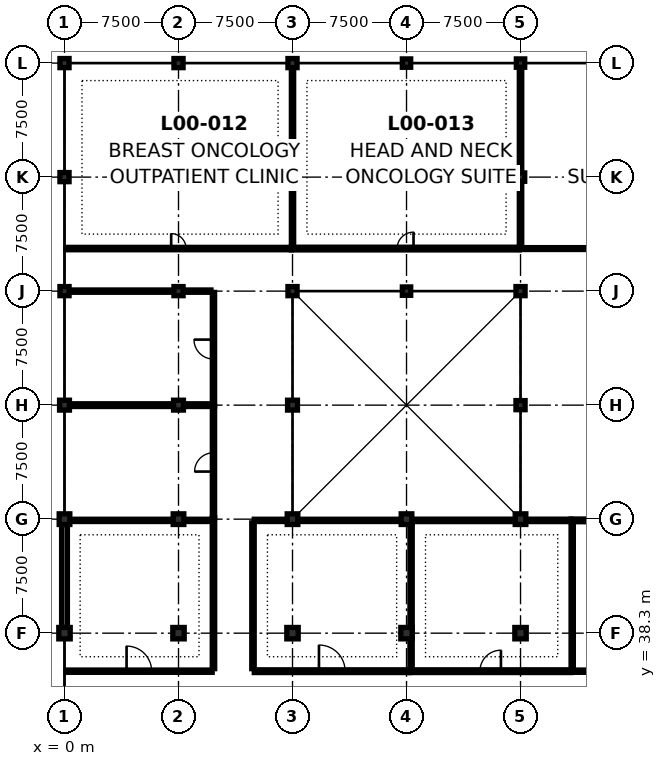
"""IFC4 building model, lengths in metres.
Left out: names, types, materials, properties, quantities, classifications, styles, units other than length and angle.
Written with IfcOpenShell. Run it as: python <this file> out.ifc"""

import sys

from ifc_helpers import new_model, si_unit, direction, frame, frame_2d, origin, origin_2d, place, context, subcontext, project, spatial, rectangle, extrude, element, fill, save


model = new_model("IFC4")
c1 = context("Model", 3, precision=1e-05, world=origin(), true_north=direction((0.0, 1.0)))
c2 = subcontext(c1, "Body", "Model", "MODEL_VIEW")
j1 = project(units=[si_unit("LENGTHUNIT", "METRE"), si_unit("PLANEANGLEUNIT", "RADIAN")], contexts=[c1])
p1 = place(None, origin())
s1 = spatial("IfcSite", under=j1, at=p1, CompositionType="ELEMENT")
p2 = place(p1, origin())
s2 = spatial("IfcBuilding", under=s1, at=p2, CompositionType="ELEMENT")
p3 = place(p2, origin())
s3 = spatial("IfcBuildingStorey", under=s2, at=p3, CompositionType="ELEMENT", Elevation=0.0)
p4 = place(p3, frame((0.0, 38.3, 0.0), z_axis=(0.0, 0.0, 1.0), x_axis=(1.0, 0.0, 0.0)))
e1 = element("IfcColumn", 1, at=p4, inside=s3, PredefinedType="COLUMN", context=c2, shape_type="SweptSolid", body=[
    extrude(rectangle(XDim=0.75, YDim=0.75, at=origin_2d()), origin(), (0.0, 0.0, 1.0), 4.7),
])
p5 = place(p3, frame((0.0, 45.8, 0.0), z_axis=(0.0, 0.0, 1.0), x_axis=(1.0, 0.0, 0.0)))
e2 = element("IfcColumn", 2, at=p5, inside=s3, PredefinedType="COLUMN", context=c2, shape_type="SweptSolid", body=[
    extrude(rectangle(XDim=0.7, YDim=0.7, at=origin_2d()), origin(), (0.0, 0.0, 1.0), 4.7),
])
p6 = place(p3, frame((0.0, 53.3, 0.0), z_axis=(0.0, 0.0, 1.0), x_axis=(1.0, 0.0, 0.0)))
e3 = element("IfcColumn", 3, at=p6, inside=s3, PredefinedType="COLUMN", context=c2, shape_type="SweptSolid", body=[
    extrude(rectangle(XDim=0.65, YDim=0.65, at=origin_2d()), origin(), (0.0, 0.0, 1.0), 4.7),
])
for number, where, z_axis, x_axis in (
    (4, (0.0, 60.8, 0.0), (0.0, 0.0, 1.0), (1.0, 0.0, 0.0)),
    (5, (0.0, 68.3, 0.0), (0.0, 0.0, 1.0), (1.0, 0.0, 0.0)),
    (6, (0.0, 75.8, 0.0), (0.0, 0.0, 1.0), (1.0, 0.0, 0.0)),
):
    element("IfcColumn", number, at=place(p3, frame(where, z_axis=z_axis, x_axis=x_axis)), inside=s3, PredefinedType="COLUMN", context=c2, shape_type="SweptSolid", body=[
        extrude(rectangle(XDim=0.6, YDim=0.6, at=origin_2d()), origin(), (0.0, 0.0, 1.0), 4.7),
    ])
p7 = place(p3, frame((7.5, 38.3, 0.0), z_axis=(0.0, 0.0, 1.0), x_axis=(1.0, 0.0, 0.0)))
e7 = element("IfcColumn", 7, at=p7, inside=s3, PredefinedType="COLUMN", context=c2, shape_type="SweptSolid", body=[
    extrude(rectangle(XDim=0.75, YDim=0.75, at=origin_2d()), origin(), (0.0, 0.0, 1.0), 4.7),
])
p8 = place(p3, frame((7.5, 45.8, 0.0), z_axis=(0.0, 0.0, 1.0), x_axis=(1.0, 0.0, 0.0)))
e8 = element("IfcColumn", 8, at=p8, inside=s3, PredefinedType="COLUMN", context=c2, shape_type="SweptSolid", body=[
    extrude(rectangle(XDim=0.7, YDim=0.7, at=origin_2d()), origin(), (0.0, 0.0, 1.0), 4.7),
])
p9 = place(p3, frame((7.5, 53.3, 0.0), z_axis=(0.0, 0.0, 1.0), x_axis=(1.0, 0.0, 0.0)))
e9 = element("IfcColumn", 9, at=p9, inside=s3, PredefinedType="COLUMN", context=c2, shape_type="SweptSolid", body=[
    extrude(rectangle(XDim=0.65, YDim=0.65, at=origin_2d()), origin(), (0.0, 0.0, 1.0), 4.7),
])
for number, where, z_axis, x_axis in (
    (10, (7.5, 60.8, 0.0), (0.0, 0.0, 1.0), (1.0, 0.0, 0.0)),
    (11, (7.5, 68.3, 0.0), (0.0, 0.0, 1.0), (1.0, 0.0, 0.0)),
    (12, (7.5, 75.8, 0.0), (0.0, 0.0, 1.0), (1.0, 0.0, 0.0)),
):
    element("IfcColumn", number, at=place(p3, frame(where, z_axis=z_axis, x_axis=x_axis)), inside=s3, PredefinedType="COLUMN", context=c2, shape_type="SweptSolid", body=[
        extrude(rectangle(XDim=0.6, YDim=0.6, at=origin_2d()), origin(), (0.0, 0.0, 1.0), 4.7),
    ])
p10 = place(p3, frame((15.0, 38.3, 0.0), z_axis=(0.0, 0.0, 1.0), x_axis=(1.0, 0.0, 0.0)))
e13 = element("IfcColumn", 13, at=p10, inside=s3, PredefinedType="COLUMN", context=c2, shape_type="SweptSolid", body=[
    extrude(rectangle(XDim=0.75, YDim=0.75, at=origin_2d()), origin(), (0.0, 0.0, 1.0), 4.7),
])
p11 = place(p3, frame((15.0, 45.8, 0.0), z_axis=(0.0, 0.0, 1.0), x_axis=(1.0, 0.0, 0.0)))
e14 = element("IfcColumn", 14, at=p11, inside=s3, PredefinedType="COLUMN", context=c2, shape_type="SweptSolid", body=[
    extrude(rectangle(XDim=0.7, YDim=0.7, at=origin_2d()), origin(), (0.0, 0.0, 1.0), 4.7),
])
p12 = place(p3, frame((15.0, 53.3, 0.0), z_axis=(0.0, 0.0, 1.0), x_axis=(1.0, 0.0, 0.0)))
e15 = element("IfcColumn", 15, at=p12, inside=s3, PredefinedType="COLUMN", context=c2, shape_type="SweptSolid", body=[
    extrude(rectangle(XDim=0.65, YDim=0.65, at=origin_2d()), origin(), (0.0, 0.0, 1.0), 4.7),
])
for number, where, z_axis, x_axis in (
    (16, (15.0, 60.8, 0.0), (0.0, 0.0, 1.0), (1.0, 0.0, 0.0)),
    (17, (15.0, 68.3, 0.0), (0.0, 0.0, 1.0), (1.0, 0.0, 0.0)),
    (18, (15.0, 75.8, 0.0), (0.0, 0.0, 1.0), (1.0, 0.0, 0.0)),
):
    element("IfcColumn", number, at=place(p3, frame(where, z_axis=z_axis, x_axis=x_axis)), inside=s3, PredefinedType="COLUMN", context=c2, shape_type="SweptSolid", body=[
        extrude(rectangle(XDim=0.6, YDim=0.6, at=origin_2d()), origin(), (0.0, 0.0, 1.0), 4.7),
    ])
p13 = place(p3, frame((22.5, 38.3, 0.0), z_axis=(0.0, 0.0, 1.0), x_axis=(1.0, 0.0, 0.0)))
e19 = element("IfcColumn", 19, at=p13, inside=s3, PredefinedType="COLUMN", context=c2, shape_type="SweptSolid", body=[
    extrude(rectangle(XDim=0.75, YDim=0.75, at=origin_2d()), origin(), (0.0, 0.0, 1.0), 4.7),
])
p14 = place(p3, frame((22.5, 45.8, 0.0), z_axis=(0.0, 0.0, 1.0), x_axis=(1.0, 0.0, 0.0)))
e20 = element("IfcColumn", 20, at=p14, inside=s3, PredefinedType="COLUMN", context=c2, shape_type="SweptSolid", body=[
    extrude(rectangle(XDim=0.7, YDim=0.7, at=origin_2d()), origin(), (0.0, 0.0, 1.0), 4.7),
])
for number, where, z_axis, x_axis in (
    (21, (22.5, 60.8, 0.0), (0.0, 0.0, 1.0), (1.0, 0.0, 0.0)),
    (22, (22.5, 68.3, 0.0), (0.0, 0.0, 1.0), (1.0, 0.0, 0.0)),
    (23, (22.5, 75.8, 0.0), (0.0, 0.0, 1.0), (1.0, 0.0, 0.0)),
):
    element("IfcColumn", number, at=place(p3, frame(where, z_axis=z_axis, x_axis=x_axis)), inside=s3, PredefinedType="COLUMN", context=c2, shape_type="SweptSolid", body=[
        extrude(rectangle(XDim=0.55, YDim=0.55, at=origin_2d()), origin(), (0.0, 0.0, 1.0), 4.7),
    ])
p15 = place(p3, frame((30.0, 38.3, 0.0), z_axis=(0.0, 0.0, 1.0), x_axis=(1.0, 0.0, 0.0)))
e24 = element("IfcColumn", 24, at=p15, inside=s3, PredefinedType="COLUMN", context=c2, shape_type="SweptSolid", body=[
    extrude(rectangle(XDim=0.75, YDim=0.75, at=origin_2d()), origin(), (0.0, 0.0, 1.0), 4.7),
])
p16 = place(p3, frame((30.0, 45.8, 0.0), z_axis=(0.0, 0.0, 1.0), x_axis=(1.0, 0.0, 0.0)))
e25 = element("IfcColumn", 25, at=p16, inside=s3, PredefinedType="COLUMN", context=c2, shape_type="SweptSolid", body=[
    extrude(rectangle(XDim=0.7, YDim=0.7, at=origin_2d()), origin(), (0.0, 0.0, 1.0), 4.7),
])
for number, where, z_axis, x_axis in (
    (26, (30.0, 53.3, 0.0), (0.0, 0.0, 1.0), (1.0, 0.0, 0.0)),
    (27, (30.0, 60.8, 0.0), (0.0, 0.0, 1.0), (1.0, 0.0, 0.0)),
):
    element("IfcColumn", number, at=place(p3, frame(where, z_axis=z_axis, x_axis=x_axis)), inside=s3, PredefinedType="COLUMN", context=c2, shape_type="SweptSolid", body=[
        extrude(rectangle(XDim=0.6, YDim=0.6, at=origin_2d()), origin(), (0.0, 0.0, 1.0), 4.7),
    ])
for number, where, z_axis, x_axis in (
    (28, (30.0, 68.3, 0.0), (0.0, 0.0, 1.0), (1.0, 0.0, 0.0)),
    (29, (30.0, 75.8, 0.0), (0.0, 0.0, 1.0), (1.0, 0.0, 0.0)),
):
    element("IfcColumn", number, at=place(p3, frame(where, z_axis=z_axis, x_axis=x_axis)), inside=s3, PredefinedType="COLUMN", context=c2, shape_type="SweptSolid", body=[
        extrude(rectangle(XDim=0.55, YDim=0.55, at=origin_2d()), origin(), (0.0, 0.0, 1.0), 4.7),
    ])
p17 = place(p3, frame((0.0, 38.675, 0.0), z_axis=(0.0, 0.0, 1.0), x_axis=(0.0, 1.0, 0.0)))
e30 = element("IfcWall", 30, at=p17, inside=s3, PredefinedType="SOLIDWALL", context=c2, shape_type="SweptSolid", body=[
    extrude(rectangle(XDim=6.775, YDim=0.38, at=frame_2d((3.387, 0.0))), origin(), (0.0, 0.0, 1.0), 4.035),
])
p18 = place(p3, frame((0.102, 35.8, 0.0), z_axis=(0.0, 0.0, 1.0), x_axis=(1.0, 0.0, 0.0)))
e31 = element("IfcWall", 31, at=p18, inside=s3, PredefinedType="PARTITIONING", context=c2, shape_type="SweptSolid", body=[
    extrude(rectangle(XDim=9.613, YDim=0.15, at=frame_2d((4.807, 0.0))), origin(), (0.0, 0.0, 1.0), 3.765),
])
p19 = place(p18, frame((3.981, 0.0, 0.0)))
e32 = element("IfcOpeningElement", 32, at=p19, cuts=e31, PredefinedType="OPENING", context=c2, shape_type="SweptSolid", body=[
    extrude(rectangle(XDim=1.65, YDim=2.32, at=frame_2d((0.825, 1.16))), frame((0.0, 0.087, 0.0), z_axis=(0.0, -1.0, 0.0), x_axis=(1.0, 0.0, 0.0)), (0.0, 0.0, 1.0), 0.174),
])
p20 = place(p3, frame((12.485, 35.8, 0.0), z_axis=(0.0, 0.0, 1.0), x_axis=(1.0, 0.0, 0.0)))
e33 = element("IfcWall", 33, at=p20, inside=s3, PredefinedType="PARTITIONING", context=c2, shape_type="SweptSolid", body=[
    extrude(rectangle(XDim=10.23, YDim=0.18, at=frame_2d((5.115, 0.0))), origin(), (0.0, 0.0, 1.0), 3.765),
])
p21 = place(p20, frame((4.255, 0.0, 0.0)))
e34 = element("IfcOpeningElement", 34, at=p21, cuts=e33, PredefinedType="OPENING", context=c2, shape_type="SweptSolid", body=[
    extrude(rectangle(XDim=1.72, YDim=2.34, at=frame_2d((0.86, 1.17))), frame((0.0, 0.102, 0.0), z_axis=(0.0, -1.0, 0.0), x_axis=(1.0, 0.0, 0.0)), (0.0, 0.0, 1.0), 0.204),
])
p22 = place(p3, frame((22.727, 35.8, 0.0), z_axis=(0.0, 0.0, 1.0), x_axis=(1.0, 0.0, 0.0)))
e35 = element("IfcWall", 35, at=p22, inside=s3, PredefinedType="PARTITIONING", context=c2, shape_type="SweptSolid", body=[
    extrude(rectangle(XDim=10.588, YDim=0.18, at=frame_2d((5.294, 0.0))), origin(), (0.0, 0.0, 1.0), 3.765),
])
p23 = place(p22, frame((4.604, 0.0, 0.0)))
e36 = element("IfcOpeningElement", 36, at=p23, cuts=e35, PredefinedType="OPENING", context=c2, shape_type="SweptSolid", body=[
    extrude(rectangle(XDim=1.38, YDim=2.3, at=frame_2d((0.69, 1.15))), frame((0.0, 0.102, 0.0), z_axis=(0.0, -1.0, 0.0), x_axis=(1.0, 0.0, 0.0)), (0.0, 0.0, 1.0), 0.204),
])
p24 = place(p3, frame((33.327, 35.8, 0.0), z_axis=(0.0, 0.0, 1.0), x_axis=(1.0, 0.0, 0.0)))
e37 = element("IfcWall", 37, at=p24, inside=s3, PredefinedType="PARTITIONING", context=c2, shape_type="SweptSolid", body=[
    extrude(rectangle(XDim=6.388, YDim=0.15, at=frame_2d((3.194, 0.0))), origin(), (0.0, 0.0, 1.0), 3.985),
])
p25 = place(p24, frame((2.474, 0.0, 0.0)))
e38 = element("IfcOpeningElement", 38, at=p25, cuts=e37, PredefinedType="OPENING", context=c2, shape_type="SweptSolid", body=[
    extrude(rectangle(XDim=1.44, YDim=2.32, at=frame_2d((0.72, 1.16))), frame((0.0, 0.087, 0.0), z_axis=(0.0, -1.0, 0.0), x_axis=(1.0, 0.0, 0.0)), (0.0, 0.0, 1.0), 0.174),
])
p26 = place(p3, frame((0.102, 63.6, 0.0), z_axis=(0.0, 0.0, 1.0), x_axis=(1.0, 0.0, 0.0)))
e39 = element("IfcWall", 39, at=p26, inside=s3, PredefinedType="PARTITIONING", context=c2, shape_type="SweptSolid", body=[
    extrude(rectangle(XDim=14.813, YDim=0.16, at=frame_2d((7.406, 0.0))), origin(), (0.0, 0.0, 1.0), 3.765),
])
p27 = place(p26, frame((6.917, 0.0, 0.0)))
e40 = element("IfcOpeningElement", 40, at=p27, cuts=e39, PredefinedType="OPENING", context=c2, shape_type="SweptSolid", body=[
    extrude(rectangle(XDim=0.98, YDim=2.12, at=frame_2d((0.49, 1.06))), frame((0.0, 0.092, 0.0), z_axis=(0.0, -1.0, 0.0), x_axis=(1.0, 0.0, 0.0)), (0.0, 0.0, 1.0), 0.184),
])
p28 = place(p3, frame((14.927, 63.6, 0.0), z_axis=(0.0, 0.0, 1.0), x_axis=(1.0, 0.0, 0.0)))
e41 = element("IfcWall", 41, at=p28, inside=s3, PredefinedType="PARTITIONING", context=c2, shape_type="SweptSolid", body=[
    extrude(rectangle(XDim=14.988, YDim=0.18, at=frame_2d((7.494, 0.0))), origin(), (0.0, 0.0, 1.0), 3.765),
])
p29 = place(p28, frame((6.954, 0.0, 0.0)))
e42 = element("IfcOpeningElement", 42, at=p29, cuts=e41, PredefinedType="OPENING", context=c2, shape_type="SweptSolid", body=[
    extrude(rectangle(XDim=1.08, YDim=2.18, at=frame_2d((0.54, 1.09))), frame((0.0, 0.102, 0.0), z_axis=(0.0, -1.0, 0.0), x_axis=(1.0, 0.0, 0.0)), (0.0, 0.0, 1.0), 0.204),
])
p30 = place(p3, frame((29.927, 63.6, 0.0), z_axis=(0.0, 0.0, 1.0), x_axis=(1.0, 0.0, 0.0)))
e43 = element("IfcWall", 43, at=p30, inside=s3, PredefinedType="PARTITIONING", context=c2, shape_type="SweptSolid", body=[
    extrude(rectangle(XDim=14.971, YDim=0.125, at=frame_2d((7.485, 0.0))), origin(), (0.0, 0.0, 1.0), 3.985),
])
p31 = place(p30, frame((6.926, 0.0, 0.0)))
e44 = element("IfcOpeningElement", 44, at=p31, cuts=e43, PredefinedType="OPENING", context=c2, shape_type="SweptSolid", body=[
    extrude(rectangle(XDim=1.12, YDim=2.2, at=frame_2d((0.56, 1.1))), frame((0.0, 0.074, 0.0), z_axis=(0.0, -1.0, 0.0), x_axis=(1.0, 0.0, 0.0)), (0.0, 0.0, 1.0), 0.149),
])
p32 = place(p3, frame((9.8, 45.885, 0.0), z_axis=(0.0, 0.0, 1.0), x_axis=(0.0, 1.0, 0.0)))
e45 = element("IfcWall", 45, at=p32, inside=s3, PredefinedType="PARTITIONING", context=c2, shape_type="SweptSolid", body=[
    extrude(rectangle(XDim=7.33, YDim=0.15, at=frame_2d((3.665, 0.0))), origin(), (0.0, 0.0, 1.0), 3.765),
])
p33 = place(p32, frame((3.045, 0.0, 0.0)))
e46 = element("IfcOpeningElement", 46, at=p33, cuts=e45, PredefinedType="OPENING", context=c2, shape_type="SweptSolid", body=[
    extrude(rectangle(XDim=1.24, YDim=2.2, at=frame_2d((0.62, 1.1))), frame((0.0, 0.087, 0.0), z_axis=(0.0, -1.0, 0.0), x_axis=(1.0, 0.0, 0.0)), (0.0, 0.0, 1.0), 0.174),
])
p34 = place(p3, frame((9.8, 53.227, 0.0), z_axis=(0.0, 0.0, 1.0), x_axis=(0.0, 1.0, 0.0)))
e47 = element("IfcWall", 47, at=p34, inside=s3, PredefinedType="PARTITIONING", context=c2, shape_type="SweptSolid", body=[
    extrude(rectangle(XDim=7.488, YDim=0.15, at=frame_2d((3.744, 0.0))), origin(), (0.0, 0.0, 1.0), 3.765),
])
p35 = place(p34, frame((3.104, 0.0, 0.0)))
e48 = element("IfcOpeningElement", 48, at=p35, cuts=e47, PredefinedType="OPENING", context=c2, shape_type="SweptSolid", body=[
    extrude(rectangle(XDim=1.28, YDim=2.22, at=frame_2d((0.64, 1.11))), frame((0.0, 0.087, 0.0), z_axis=(0.0, -1.0, 0.0), x_axis=(1.0, 0.0, 0.0)), (0.0, 0.0, 1.0), 0.174),
])
p36 = place(p3, frame((0.332, 45.72, 0.0), z_axis=(0.0, 0.0, 1.0), x_axis=(1.0, 0.0, 0.0)))
e49 = element("IfcWall", 49, at=p36, inside=s3, PredefinedType="PARTITIONING", context=c2, shape_type="SweptSolid", body=[
    extrude(rectangle(XDim=9.383, YDim=0.15, at=frame_2d((4.691, 0.0))), origin(), (0.0, 0.0, 1.0), 3.765),
])
p37 = place(p3, frame((12.485, 45.72, 0.0), z_axis=(0.0, 0.0, 1.0), x_axis=(1.0, 0.0, 0.0)))
e50 = element("IfcWall", 50, at=p37, inside=s3, PredefinedType="PARTITIONING", context=c2, shape_type="SweptSolid", body=[
    extrude(rectangle(XDim=10.063, YDim=0.15, at=frame_2d((5.031, 0.0))), origin(), (0.0, 0.0, 1.0), 3.765),
])
p38 = place(p3, frame((23.052, 45.72, 0.0), z_axis=(0.0, 0.0, 1.0), x_axis=(1.0, 0.0, 0.0)))
e51 = element("IfcWall", 51, at=p38, inside=s3, PredefinedType="PARTITIONING", context=c2, shape_type="SweptSolid", body=[
    extrude(rectangle(XDim=10.263, YDim=0.16, at=frame_2d((5.131, 0.0))), origin(), (0.0, 0.0, 1.0), 3.765),
])
p39 = place(p3, frame((33.327, 45.72, 0.0), z_axis=(0.0, 0.0, 1.0), x_axis=(1.0, 0.0, 0.0)))
e52 = element("IfcWall", 52, at=p39, inside=s3, PredefinedType="PARTITIONING", context=c2, shape_type="SweptSolid", body=[
    extrude(rectangle(XDim=6.388, YDim=0.18, at=frame_2d((3.194, 0.0))), origin(), (0.0, 0.0, 1.0), 3.985),
])
p40 = place(p3, frame((9.8, 35.965, 0.0), z_axis=(0.0, 0.0, 1.0), x_axis=(0.0, 1.0, 0.0)))
e53 = element("IfcWall", 53, at=p40, inside=s3, PredefinedType="PARTITIONING", context=c2, shape_type="SweptSolid", body=[
    extrude(rectangle(XDim=9.908, YDim=0.16, at=frame_2d((4.954, 0.0))), origin(), (0.0, 0.0, 1.0), 3.765),
])
p41 = place(p3, frame((12.4, 35.965, 0.0), z_axis=(0.0, 0.0, 1.0), x_axis=(0.0, 1.0, 0.0)))
e54 = element("IfcWall", 54, at=p41, inside=s3, PredefinedType="PARTITIONING", context=c2, shape_type="SweptSolid", body=[
    extrude(rectangle(XDim=9.59, YDim=0.16, at=frame_2d((4.795, 0.0))), origin(), (0.0, 0.0, 1.0), 3.765),
])
p42 = place(p3, frame((22.8, 35.902, 0.0), z_axis=(0.0, 0.0, 1.0), x_axis=(0.0, 1.0, 0.0)))
e55 = element("IfcWall", 55, at=p42, inside=s3, PredefinedType="PARTITIONING", context=c2, shape_type="SweptSolid", body=[
    extrude(rectangle(XDim=9.536, YDim=0.15, at=frame_2d((4.768, 0.0))), origin(), (0.0, 0.0, 1.0), 3.765),
])
p43 = place(p3, frame((33.4, 35.887, 0.0), z_axis=(0.0, 0.0, 1.0), x_axis=(0.0, 1.0, 0.0)))
e56 = element("IfcWall", 56, at=p43, inside=s3, PredefinedType="PARTITIONING", context=c2, shape_type="SweptSolid", body=[
    extrude(rectangle(XDim=9.731, YDim=0.15, at=frame_2d((4.865, 0.0))), origin(), (0.0, 0.0, 1.0), 3.985),
])
p44 = place(p3, frame((15.0, 63.702, 0.0), z_axis=(0.0, 0.0, 1.0), x_axis=(0.0, 1.0, 0.0)))
e57 = element("IfcWall", 57, at=p44, inside=s3, PredefinedType="PARTITIONING", context=c2, shape_type="SweptSolid", body=[
    extrude(rectangle(XDim=11.786, YDim=0.15, at=frame_2d((5.893, 0.0))), origin(), (0.0, 0.0, 1.0), 3.765),
])
p45 = place(p3, frame((30.0, 63.675, 0.0), z_axis=(0.0, 0.0, 1.0), x_axis=(0.0, 1.0, 0.0)))
e58 = element("IfcWall", 58, at=p45, inside=s3, PredefinedType="PARTITIONING", context=c2, shape_type="SweptSolid", body=[
    extrude(rectangle(XDim=11.838, YDim=0.16, at=frame_2d((5.919, 0.0))), origin(), (0.0, 0.0, 1.0), 3.765),
])
p46 = place(p3, frame((0.337, 53.3, 0.0), z_axis=(0.0, 0.0, 1.0), x_axis=(1.0, 0.0, 0.0)))
e59 = element("IfcWall", 59, at=p46, inside=s3, PredefinedType="PARTITIONING", context=c2, shape_type="SweptSolid", body=[
    extrude(rectangle(XDim=9.376, YDim=0.18, at=frame_2d((4.688, 0.0))), origin(), (0.0, 0.0, 1.0), 3.765),
])
p47 = place(p3, frame((0.312, 60.8, 0.0), z_axis=(0.0, 0.0, 1.0), x_axis=(1.0, 0.0, 0.0)))
e60 = element("IfcWall", 60, at=p47, inside=s3, PredefinedType="PARTITIONING", context=c2, shape_type="SweptSolid", body=[
    extrude(rectangle(XDim=9.323, YDim=0.15, at=frame_2d((4.662, 0.0))), origin(), (0.0, 0.0, 1.0), 3.765),
])
p48 = place(p19, origin())
e61 = element("IfcDoor", 61, at=p48, inside=s3, OperationType="SINGLE_SWING_LEFT", PredefinedType="DOOR", context=c2, shape_type="SweptSolid", body=[
    extrude(rectangle(XDim=1.65, YDim=2.32, at=frame_2d((0.825, 1.16))), frame((0.0, 0.025, 0.0), z_axis=(0.0, -1.0, 0.0), x_axis=(1.0, 0.0, 0.0)), (0.0, 0.0, 1.0), 0.05),
])
fill(e32, e61)
p49 = place(p21, origin())
e62 = element("IfcDoor", 62, at=p49, inside=s3, OperationType="SINGLE_SWING_LEFT", PredefinedType="DOOR", context=c2, shape_type="SweptSolid", body=[
    extrude(rectangle(XDim=1.72, YDim=2.34, at=frame_2d((0.86, 1.17))), frame((0.0, 0.025, 0.0), z_axis=(0.0, -1.0, 0.0), x_axis=(1.0, 0.0, 0.0)), (0.0, 0.0, 1.0), 0.05),
])
fill(e34, e62)
p50 = place(p23, origin())
e63 = element("IfcDoor", 63, at=p50, inside=s3, OperationType="SINGLE_SWING_RIGHT", PredefinedType="DOOR", context=c2, shape_type="SweptSolid", body=[
    extrude(rectangle(XDim=1.38, YDim=2.3, at=frame_2d((0.69, 1.15))), frame((0.0, 0.025, 0.0), z_axis=(0.0, -1.0, 0.0), x_axis=(1.0, 0.0, 0.0)), (0.0, 0.0, 1.0), 0.05),
])
fill(e36, e63)
p51 = place(p27, origin())
e64 = element("IfcDoor", 64, at=p51, inside=s3, OperationType="SINGLE_SWING_LEFT", PredefinedType="DOOR", context=c2, shape_type="SweptSolid", body=[
    extrude(rectangle(XDim=0.98, YDim=2.12, at=frame_2d((0.49, 1.06))), frame((0.0, 0.025, 0.0), z_axis=(0.0, -1.0, 0.0), x_axis=(1.0, 0.0, 0.0)), (0.0, 0.0, 1.0), 0.05),
])
fill(e40, e64)
p52 = place(p29, origin())
e65 = element("IfcDoor", 65, at=p52, inside=s3, OperationType="SINGLE_SWING_RIGHT", PredefinedType="DOOR", context=c2, shape_type="SweptSolid", body=[
    extrude(rectangle(XDim=1.08, YDim=2.18, at=frame_2d((0.54, 1.09))), frame((0.0, 0.025, 0.0), z_axis=(0.0, -1.0, 0.0), x_axis=(1.0, 0.0, 0.0)), (0.0, 0.0, 1.0), 0.05),
])
fill(e42, e65)
p53 = place(p33, origin())
e66 = element("IfcDoor", 66, at=p53, inside=s3, OperationType="SINGLE_SWING_LEFT", PredefinedType="DOOR", context=c2, shape_type="SweptSolid", body=[
    extrude(rectangle(XDim=1.24, YDim=2.2, at=frame_2d((0.62, 1.1))), frame((0.0, 0.025, 0.0), z_axis=(0.0, -1.0, 0.0), x_axis=(1.0, 0.0, 0.0)), (0.0, 0.0, 1.0), 0.05),
])
fill(e46, e66)
p54 = place(p35, origin())
e67 = element("IfcDoor", 67, at=p54, inside=s3, OperationType="SINGLE_SWING_RIGHT", PredefinedType="DOOR", context=c2, shape_type="SweptSolid", body=[
    extrude(rectangle(XDim=1.28, YDim=2.22, at=frame_2d((0.64, 1.11))), frame((0.0, 0.025, 0.0), z_axis=(0.0, -1.0, 0.0), x_axis=(1.0, 0.0, 0.0)), (0.0, 0.0, 1.0), 0.05),
])
fill(e48, e67)
save(model, sys.argv[1])
